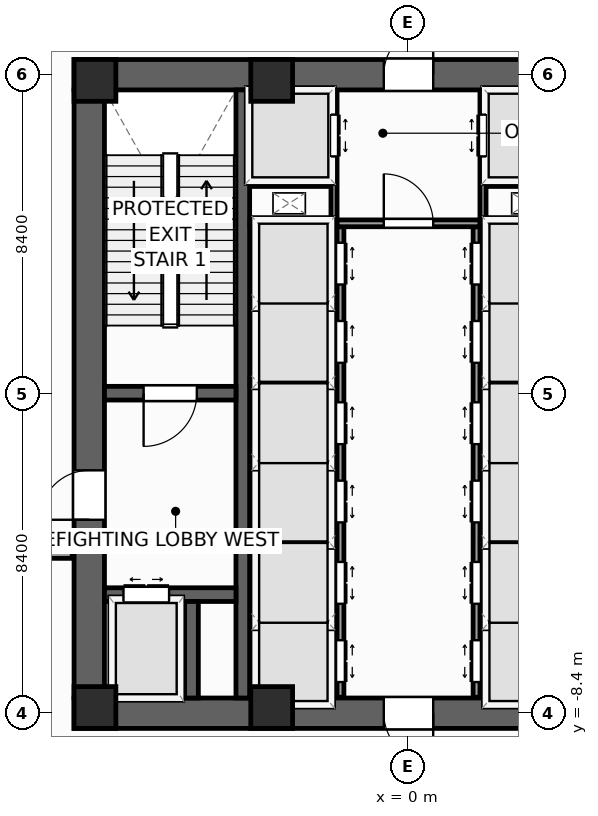
"""IFC4 building model, lengths in metres.
Left out: names, types, materials, properties, quantities, classifications, styles, units other than length and angle.
Written with IfcOpenShell. Run it as: python <this file> out.ifc"""

import sys

from ifc_helpers import new_model, si_unit, direction, frame, frame_2d, origin, origin_2d, place, context, subcontext, project, spatial, rectangle, extrude, source, transform, mapped, element, fill, save


model = new_model("IFC4")
c1 = context("Model", 3, precision=1e-05, world=origin(), true_north=direction((0.0, 1.0)))
c2 = subcontext(c1, "Body", "Model", "MODEL_VIEW")
j1 = project(units=[si_unit("LENGTHUNIT", "METRE"), si_unit("PLANEANGLEUNIT", "RADIAN")], contexts=[c1])
p1 = place(None, origin())
s1 = spatial("IfcSite", under=j1, at=p1, CompositionType="ELEMENT")
p2 = place(p1, origin())
s2 = spatial("IfcBuilding", under=s1, at=p2, CompositionType="ELEMENT")
p3 = place(p2, origin())
s3 = spatial("IfcBuildingStorey", under=s2, at=p3, CompositionType="ELEMENT", Elevation=0.0)
p4 = place(p3, frame((-8.8, -8.4, 0.0), z_axis=(0.0, 0.0, 1.0), x_axis=(1.0, 0.0, 0.0)))
e1 = element("IfcWall", 1, at=p4, inside=s3, PredefinedType="SHEAR", context=c2, shape_type="SweptSolid", body=[
    extrude(rectangle(XDim=17.6, YDim=0.8, at=frame_2d((8.8, 0.0))), origin(), (0.0, 0.0, 1.0), 6.0),
])
p5 = place(p4, frame((8.15, 0.0, 0.0)))
e2 = element("IfcOpeningElement", 2, at=p5, cuts=e1, PredefinedType="OPENING", context=c2, shape_type="SweptSolid", body=[
    extrude(rectangle(XDim=1.3, YDim=2.2, at=frame_2d((0.65, 1.1))), frame((0.0, 0.41, 0.0), z_axis=(0.0, -1.0, 0.0), x_axis=(1.0, 0.0, 0.0)), (0.0, 0.0, 1.0), 0.82),
])
p6 = place(p3, frame((-8.8, 8.4, 0.0), z_axis=(0.0, 0.0, 1.0), x_axis=(1.0, 0.0, 0.0)))
e3 = element("IfcWall", 3, at=p6, inside=s3, PredefinedType="SHEAR", context=c2, shape_type="SweptSolid", body=[
    extrude(rectangle(XDim=17.6, YDim=0.8, at=frame_2d((8.8, 0.0))), origin(), (0.0, 0.0, 1.0), 6.0),
])
p7 = place(p6, frame((8.15, 0.0, 0.0)))
e4 = element("IfcOpeningElement", 4, at=p7, cuts=e3, PredefinedType="OPENING", context=c2, shape_type="SweptSolid", body=[
    extrude(rectangle(XDim=1.3, YDim=2.2, at=frame_2d((0.65, 1.1))), frame((0.0, 0.41, 0.0), z_axis=(0.0, -1.0, 0.0), x_axis=(1.0, 0.0, 0.0)), (0.0, 0.0, 1.0), 0.82),
])
p8 = place(p3, frame((-8.4, -8.0, 0.0), z_axis=(0.0, 0.0, 1.0), x_axis=(0.0, 1.0, 0.0)))
e5 = element("IfcWall", 5, at=p8, inside=s3, PredefinedType="SHEAR", context=c2, shape_type="SweptSolid", body=[
    extrude(rectangle(XDim=16.0, YDim=0.8, at=frame_2d((8.0, 0.0))), origin(), (0.0, 0.0, 1.0), 6.0),
])
p9 = place(p8, frame((4.69, 0.0, 0.0)))
e6 = element("IfcOpeningElement", 6, at=p9, cuts=e5, PredefinedType="OPENING", context=c2, shape_type="SweptSolid", body=[
    extrude(rectangle(XDim=1.3, YDim=2.2, at=frame_2d((0.65, 1.1))), frame((0.0, 0.41, 0.0), z_axis=(0.0, -1.0, 0.0), x_axis=(1.0, 0.0, 0.0)), (0.0, 0.0, 1.0), 0.82),
])
p10 = place(p3, frame((-4.36, -8.0, 0.0), z_axis=(0.0, 0.0, 1.0), x_axis=(0.0, 1.0, 0.0)))
e7 = element("IfcWall", 7, at=p10, inside=s3, PredefinedType="SHEAR", context=c2, shape_type="SweptSolid", body=[
    extrude(rectangle(XDim=16.0, YDim=0.36, at=frame_2d((8.0, 0.0))), origin(), (0.0, 0.0, 1.0), 6.0),
])
p11 = place(p3, frame((-8.0, 0.02, 0.0), z_axis=(0.0, 0.0, 1.0), x_axis=(1.0, 0.0, 0.0)))
e8 = element("IfcWall", 8, at=p11, inside=s3, PredefinedType="SHEAR", context=c2, shape_type="SweptSolid", body=[
    extrude(rectangle(XDim=3.46, YDim=0.36, at=frame_2d((1.73, 0.0))), origin(), (0.0, 0.0, 1.0), 6.0),
])
p12 = place(p11, frame((1.03, 0.0, 0.0)))
e9 = element("IfcOpeningElement", 9, at=p12, cuts=e8, PredefinedType="OPENING", context=c2, shape_type="SweptSolid", body=[
    extrude(rectangle(XDim=1.4, YDim=2.2, at=frame_2d((0.7, 1.1))), frame((0.0, 0.19, 0.0), z_axis=(0.0, -1.0, 0.0), x_axis=(1.0, 0.0, 0.0)), (0.0, 0.0, 1.0), 0.38),
])
p13 = place(p3, frame((-8.0, -5.28, 0.0), z_axis=(0.0, 0.0, 1.0), x_axis=(1.0, 0.0, 0.0)))
e10 = element("IfcWall", 10, at=p13, inside=s3, PredefinedType="SHEAR", context=c2, shape_type="SweptSolid", body=[
    extrude(rectangle(XDim=3.46, YDim=0.36, at=frame_2d((1.73, 0.0))), origin(), (0.0, 0.0, 1.0), 6.0),
])
p14 = place(p13, frame((0.5, 0.0, 0.0)))
e11 = element("IfcOpeningElement", 11, at=p14, cuts=e10, PredefinedType="OPENING", context=c2, shape_type="SweptSolid", body=[
    extrude(rectangle(XDim=1.2, YDim=2.25, at=frame_2d((0.6, 1.125))), frame((0.0, 0.19, 0.0), z_axis=(0.0, -1.0, 0.0), x_axis=(1.0, 0.0, 0.0)), (0.0, 0.0, 1.0), 0.38),
])
p15 = place(p3, frame((-5.71, -8.0, 0.0), z_axis=(0.0, 0.0, 1.0), x_axis=(0.0, 1.0, 0.0)))
e12 = element("IfcWall", 12, at=p15, inside=s3, PredefinedType="SHEAR", context=c2, shape_type="SweptSolid", body=[
    extrude(rectangle(XDim=2.54, YDim=0.36, at=frame_2d((1.27, 0.0))), origin(), (0.0, 0.0, 1.0), 6.0),
])
m1 = source(origin(), c2, "Body", "SweptSolid", [
    extrude(rectangle(XDim=1.1, YDim=1.1, at=origin_2d()), origin(), (0.0, 0.0, 1.0), 6.0),
])
for number, where, z_axis, x_axis in (
    (13, (-8.25, -8.25, 0.0), (0.0, 0.0, 1.0), (1.0, 0.0, 0.0)),
    (14, (-8.25, 8.25, 0.0), (0.0, 0.0, 1.0), (1.0, 0.0, 0.0)),
    (15, (-3.6, -8.25, 0.0), (0.0, 0.0, 1.0), (1.0, 0.0, 0.0)),
    (16, (-3.6, 8.25, 0.0), (0.0, 0.0, 1.0), (1.0, 0.0, 0.0)),
):
    element("IfcColumn", number, at=place(p3, frame(where, z_axis=z_axis, x_axis=x_axis)), inside=s3, PredefinedType="PILASTER", context=c2, shape_type="MappedRepresentation", body=[
        mapped(m1, transform((0.0, 0.0, 0.0), scale=1.0)),
    ])
p16 = place(p3, frame((-1.79, -7.98, 0.0), z_axis=(0.0, 0.0, 1.0), x_axis=(0.0, 1.0, 0.0)))
e17 = element("IfcWall", 17, at=p16, inside=s3, PredefinedType="PARTITIONING", context=c2, shape_type="SweptSolid", body=[
    extrude(rectangle(XDim=12.38, YDim=0.18, at=frame_2d((6.19, 0.0))), origin(), (0.0, 0.0, 1.0), 5.66),
])
p17 = place(p16, frame((0.4, 0.0, 0.0)))
e18 = element("IfcOpeningElement", 18, at=p17, cuts=e17, PredefinedType="OPENING", context=c2, shape_type="SweptSolid", body=[
    extrude(rectangle(XDim=1.1, YDim=2.2, at=frame_2d((0.55, 1.1))), frame((0.0, 0.1, 0.0), z_axis=(0.0, -1.0, 0.0), x_axis=(1.0, 0.0, 0.0)), (0.0, 0.0, 1.0), 0.2),
])
p18 = place(p16, frame((2.46, 0.0, 0.0)))
e19 = element("IfcOpeningElement", 19, at=p18, cuts=e17, PredefinedType="OPENING", context=c2, shape_type="SweptSolid", body=[
    extrude(rectangle(XDim=1.1, YDim=2.2, at=frame_2d((0.55, 1.1))), frame((0.0, 0.1, 0.0), z_axis=(0.0, -1.0, 0.0), x_axis=(1.0, 0.0, 0.0)), (0.0, 0.0, 1.0), 0.2),
])
p19 = place(p16, frame((4.6, 0.0, 0.0)))
e20 = element("IfcOpeningElement", 20, at=p19, cuts=e17, PredefinedType="OPENING", context=c2, shape_type="SweptSolid", body=[
    extrude(rectangle(XDim=1.1, YDim=2.2, at=frame_2d((0.55, 1.1))), frame((0.0, 0.1, 0.0), z_axis=(0.0, -1.0, 0.0), x_axis=(1.0, 0.0, 0.0)), (0.0, 0.0, 1.0), 0.2),
])
p20 = place(p16, frame((6.66, 0.0, 0.0)))
e21 = element("IfcOpeningElement", 21, at=p20, cuts=e17, PredefinedType="OPENING", context=c2, shape_type="SweptSolid", body=[
    extrude(rectangle(XDim=1.1, YDim=2.2, at=frame_2d((0.55, 1.1))), frame((0.0, 0.1, 0.0), z_axis=(0.0, -1.0, 0.0), x_axis=(1.0, 0.0, 0.0)), (0.0, 0.0, 1.0), 0.2),
])
p21 = place(p16, frame((8.8, 0.0, 0.0)))
e22 = element("IfcOpeningElement", 22, at=p21, cuts=e17, PredefinedType="OPENING", context=c2, shape_type="SweptSolid", body=[
    extrude(rectangle(XDim=1.1, YDim=2.2, at=frame_2d((0.55, 1.1))), frame((0.0, 0.1, 0.0), z_axis=(0.0, -1.0, 0.0), x_axis=(1.0, 0.0, 0.0)), (0.0, 0.0, 1.0), 0.2),
])
p22 = place(p16, frame((10.86, 0.0, 0.0)))
e23 = element("IfcOpeningElement", 23, at=p22, cuts=e17, PredefinedType="OPENING", context=c2, shape_type="SweptSolid", body=[
    extrude(rectangle(XDim=1.1, YDim=2.2, at=frame_2d((0.55, 1.1))), frame((0.0, 0.1, 0.0), z_axis=(0.0, -1.0, 0.0), x_axis=(1.0, 0.0, 0.0)), (0.0, 0.0, 1.0), 0.2),
])
p23 = place(p3, frame((1.79, -7.98, 0.0), z_axis=(0.0, 0.0, 1.0), x_axis=(0.0, 1.0, 0.0)))
e24 = element("IfcWall", 24, at=p23, inside=s3, PredefinedType="PARTITIONING", context=c2, shape_type="SweptSolid", body=[
    extrude(rectangle(XDim=12.38, YDim=0.18, at=frame_2d((6.19, 0.0))), origin(), (0.0, 0.0, 1.0), 5.66),
])
p24 = place(p23, frame((0.4, 0.0, 0.0)))
e25 = element("IfcOpeningElement", 25, at=p24, cuts=e24, PredefinedType="OPENING", context=c2, shape_type="SweptSolid", body=[
    extrude(rectangle(XDim=1.1, YDim=2.2, at=frame_2d((0.55, 1.1))), frame((0.0, 0.1, 0.0), z_axis=(0.0, -1.0, 0.0), x_axis=(1.0, 0.0, 0.0)), (0.0, 0.0, 1.0), 0.2),
])
p25 = place(p23, frame((2.46, 0.0, 0.0)))
e26 = element("IfcOpeningElement", 26, at=p25, cuts=e24, PredefinedType="OPENING", context=c2, shape_type="SweptSolid", body=[
    extrude(rectangle(XDim=1.1, YDim=2.2, at=frame_2d((0.55, 1.1))), frame((0.0, 0.1, 0.0), z_axis=(0.0, -1.0, 0.0), x_axis=(1.0, 0.0, 0.0)), (0.0, 0.0, 1.0), 0.2),
])
p26 = place(p23, frame((4.6, 0.0, 0.0)))
e27 = element("IfcOpeningElement", 27, at=p26, cuts=e24, PredefinedType="OPENING", context=c2, shape_type="SweptSolid", body=[
    extrude(rectangle(XDim=1.1, YDim=2.2, at=frame_2d((0.55, 1.1))), frame((0.0, 0.1, 0.0), z_axis=(0.0, -1.0, 0.0), x_axis=(1.0, 0.0, 0.0)), (0.0, 0.0, 1.0), 0.2),
])
p27 = place(p23, frame((6.66, 0.0, 0.0)))
e28 = element("IfcOpeningElement", 28, at=p27, cuts=e24, PredefinedType="OPENING", context=c2, shape_type="SweptSolid", body=[
    extrude(rectangle(XDim=1.1, YDim=2.2, at=frame_2d((0.55, 1.1))), frame((0.0, 0.1, 0.0), z_axis=(0.0, -1.0, 0.0), x_axis=(1.0, 0.0, 0.0)), (0.0, 0.0, 1.0), 0.2),
])
p28 = place(p23, frame((8.8, 0.0, 0.0)))
e29 = element("IfcOpeningElement", 29, at=p28, cuts=e24, PredefinedType="OPENING", context=c2, shape_type="SweptSolid", body=[
    extrude(rectangle(XDim=1.1, YDim=2.2, at=frame_2d((0.55, 1.1))), frame((0.0, 0.1, 0.0), z_axis=(0.0, -1.0, 0.0), x_axis=(1.0, 0.0, 0.0)), (0.0, 0.0, 1.0), 0.2),
])
p29 = place(p23, frame((10.86, 0.0, 0.0)))
e30 = element("IfcOpeningElement", 30, at=p29, cuts=e24, PredefinedType="OPENING", context=c2, shape_type="SweptSolid", body=[
    extrude(rectangle(XDim=1.1, YDim=2.2, at=frame_2d((0.55, 1.1))), frame((0.0, 0.1, 0.0), z_axis=(0.0, -1.0, 0.0), x_axis=(1.0, 0.0, 0.0)), (0.0, 0.0, 1.0), 0.2),
])
p30 = place(p3, frame((-1.88, 4.49, 0.0), z_axis=(0.0, 0.0, 1.0), x_axis=(1.0, 0.0, 0.0)))
e31 = element("IfcWall", 31, at=p30, inside=s3, PredefinedType="PARTITIONING", context=c2, shape_type="SweptSolid", body=[
    extrude(rectangle(XDim=3.76, YDim=0.18, at=frame_2d((1.88, 0.0))), origin(), (0.0, 0.0, 1.0), 5.66),
])
p31 = place(p30, frame((1.23, 0.0, 0.0)))
e32 = element("IfcOpeningElement", 32, at=p31, cuts=e31, PredefinedType="OPENING", context=c2, shape_type="SweptSolid", body=[
    extrude(rectangle(XDim=1.3, YDim=2.2, at=frame_2d((0.65, 1.1))), frame((0.0, 0.1, 0.0), z_axis=(0.0, -1.0, 0.0), x_axis=(1.0, 0.0, 0.0)), (0.0, 0.0, 1.0), 0.2),
])
for number, where, z_axis, x_axis in (
    (33, (-4.17, -3.9, 0.0), (0.0, 0.0, 1.0), (1.0, 0.0, 0.0)),
    (34, (1.89, -3.9, 0.0), (0.0, 0.0, 1.0), (1.0, 0.0, 0.0)),
    (35, (-4.17, 0.3, 0.0), (0.0, 0.0, 1.0), (1.0, 0.0, 0.0)),
    (36, (1.89, 0.3, 0.0), (0.0, 0.0, 1.0), (1.0, 0.0, 0.0)),
    (37, (-4.17, 4.49, 0.0), (0.0, 0.0, 1.0), (1.0, 0.0, 0.0)),
    (38, (1.89, 4.49, 0.0), (0.0, 0.0, 1.0), (1.0, 0.0, 0.0)),
):
    element("IfcWall", number, at=place(p3, frame(where, z_axis=z_axis, x_axis=x_axis)), inside=s3, PredefinedType="PARTITIONING", context=c2, shape_type="SweptSolid", body=[
        extrude(rectangle(XDim=2.28, YDim=0.18, at=frame_2d((1.14, 0.0))), origin(), (0.0, 0.0, 1.0), 5.66),
    ])
for number, where, z_axis, x_axis in (
    (39, (-4.16, -6.0, 0.0), (0.0, 0.0, 1.0), (1.0, 0.0, 0.0)),
    (40, (1.9, -6.0, 0.0), (0.0, 0.0, 1.0), (1.0, 0.0, 0.0)),
    (41, (-4.16, -1.8, 0.0), (0.0, 0.0, 1.0), (1.0, 0.0, 0.0)),
    (42, (1.9, -1.8, 0.0), (0.0, 0.0, 1.0), (1.0, 0.0, 0.0)),
    (43, (-4.16, 2.4, 0.0), (0.0, 0.0, 1.0), (1.0, 0.0, 0.0)),
    (44, (1.9, 2.4, 0.0), (0.0, 0.0, 1.0), (1.0, 0.0, 0.0)),
):
    element("IfcWall", number, at=place(p3, frame(where, z_axis=z_axis, x_axis=x_axis)), inside=s3, PredefinedType="PARTITIONING", context=c2, shape_type="SweptSolid", body=[
        extrude(rectangle(XDim=2.26, YDim=0.12, at=frame_2d((1.13, 0.0))), origin(), (0.0, 0.0, 1.0), 5.66),
    ])
p32 = place(p3, frame((-1.96, 4.58, 0.0), z_axis=(0.0, 0.0, 1.0), x_axis=(0.0, 1.0, 0.0)))
e45 = element("IfcWall", 45, at=p32, inside=s3, PredefinedType="PARTITIONING", context=c2, shape_type="SweptSolid", body=[
    extrude(rectangle(XDim=3.4, YDim=0.16, at=frame_2d((1.7, 0.0))), origin(), (0.0, 0.0, 1.0), 5.66),
])
p33 = place(p32, frame((1.67, 0.0, 0.0)))
e46 = element("IfcOpeningElement", 46, at=p33, cuts=e45, PredefinedType="OPENING", context=c2, shape_type="SweptSolid", body=[
    extrude(rectangle(XDim=1.1, YDim=2.2, at=frame_2d((0.55, 1.1))), frame((0.0, 0.09, 0.0), z_axis=(0.0, -1.0, 0.0), x_axis=(1.0, 0.0, 0.0)), (0.0, 0.0, 1.0), 0.18),
])
p34 = place(p3, frame((1.96, 4.58, 0.0), z_axis=(0.0, 0.0, 1.0), x_axis=(0.0, 1.0, 0.0)))
e47 = element("IfcWall", 47, at=p34, inside=s3, PredefinedType="PARTITIONING", context=c2, shape_type="SweptSolid", body=[
    extrude(rectangle(XDim=3.4, YDim=0.16, at=frame_2d((1.7, 0.0))), origin(), (0.0, 0.0, 1.0), 5.66),
])
p35 = place(p34, frame((1.67, 0.0, 0.0)))
e48 = element("IfcOpeningElement", 48, at=p35, cuts=e47, PredefinedType="OPENING", context=c2, shape_type="SweptSolid", body=[
    extrude(rectangle(XDim=1.1, YDim=2.2, at=frame_2d((0.55, 1.1))), frame((0.0, 0.09, 0.0), z_axis=(0.0, -1.0, 0.0), x_axis=(1.0, 0.0, 0.0)), (0.0, 0.0, 1.0), 0.18),
])
for number, where, z_axis, x_axis in (
    (49, (-4.16, 5.52, 0.0), (0.0, 0.0, 1.0), (1.0, 0.0, 0.0)),
    (50, (2.06, 5.52, 0.0), (0.0, 0.0, 1.0), (1.0, 0.0, 0.0)),
):
    element("IfcWall", number, at=place(p3, frame(where, z_axis=z_axis, x_axis=x_axis)), inside=s3, PredefinedType="PARTITIONING", context=c2, shape_type="SweptSolid", body=[
        extrude(rectangle(XDim=2.1, YDim=0.12, at=frame_2d((1.05, 0.0))), origin(), (0.0, 0.0, 1.0), 5.66),
    ])
p36 = place(p3, frame((-11.55, -4.2, 0.0), z_axis=(0.0, 0.0, 1.0), x_axis=(1.0, 0.0, 0.0)))
e51 = element("IfcWall", 51, at=p36, inside=s3, PredefinedType="PARTITIONING", context=c2, shape_type="SweptSolid", body=[
    extrude(rectangle(XDim=2.7, YDim=0.25, at=frame_2d((1.35, 0.0))), origin(), (0.0, 0.0, 1.0), 5.66),
])
m2 = source(origin(), c2, "Body", "SweptSolid", [
    extrude(rectangle(XDim=1.4, YDim=2.2, at=frame_2d((0.7, 1.1))), frame((0.0, 0.025, 0.0), z_axis=(0.0, -1.0, 0.0), x_axis=(1.0, 0.0, 0.0)), (0.0, 0.0, 1.0), 0.05),
])
p37 = place(p12, frame((1.4, 0.0, 0.0), z_axis=(0.0, 0.0, 1.0), x_axis=(-1.0, 0.0, 0.0)))
e52 = element("IfcDoor", 52, at=p37, inside=s3, OperationType="SINGLE_SWING_LEFT", PredefinedType="DOOR", context=c2, shape_type="MappedRepresentation", body=[
    mapped(m2, transform((0.0, 0.0, 0.0), scale=1.0)),
])
fill(e9, e52)
m3 = source(origin(), c2, "Body", "SweptSolid", [
    extrude(rectangle(XDim=1.3, YDim=2.2, at=frame_2d((0.65, 1.1))), frame((0.0, 0.025, 0.0), z_axis=(0.0, -1.0, 0.0), x_axis=(1.0, 0.0, 0.0)), (0.0, 0.0, 1.0), 0.05),
])
p38 = place(p9, origin())
e53 = element("IfcDoor", 53, at=p38, inside=s3, OperationType="SINGLE_SWING_LEFT", PredefinedType="DOOR", context=c2, shape_type="MappedRepresentation", body=[
    mapped(m3, transform((0.0, 0.0, 0.0), scale=1.0)),
])
fill(e6, e53)
p39 = place(p5, frame((1.3, 0.0, 0.0), z_axis=(0.0, 0.0, 1.0), x_axis=(-1.0, 0.0, 0.0)))
e54 = element("IfcDoor", 54, at=p39, inside=s3, OperationType="SINGLE_SWING_RIGHT", PredefinedType="DOOR", context=c2, shape_type="MappedRepresentation", body=[
    mapped(m3, transform((0.0, 0.0, 0.0), scale=1.0)),
])
fill(e2, e54)
m4 = source(origin(), c2, "Body", "SweptSolid", [
    extrude(rectangle(XDim=1.2, YDim=2.25, at=frame_2d((0.6, 1.125))), frame((0.0, 0.025, 0.0), z_axis=(0.0, -1.0, 0.0), x_axis=(1.0, 0.0, 0.0)), (0.0, 0.0, 1.0), 0.05),
])
p40 = place(p14, origin())
e55 = element("IfcDoor", 55, at=p40, inside=s3, OperationType="DOUBLE_DOOR_SLIDING", PredefinedType="DOOR", context=c2, shape_type="MappedRepresentation", body=[
    mapped(m4, transform((0.0, 0.0, 0.0), scale=1.0)),
])
fill(e11, e55)
m5 = source(origin(), c2, "Body", "SweptSolid", [
    extrude(rectangle(XDim=1.1, YDim=2.2, at=frame_2d((0.55, 1.1))), frame((0.0, 0.025, 0.0), z_axis=(0.0, -1.0, 0.0), x_axis=(1.0, 0.0, 0.0)), (0.0, 0.0, 1.0), 0.05),
])
p41 = place(p17, frame((1.1, 0.0, 0.0), z_axis=(0.0, 0.0, 1.0), x_axis=(-1.0, 0.0, 0.0)))
e56 = element("IfcDoor", 56, at=p41, inside=s3, OperationType="DOUBLE_DOOR_SLIDING", PredefinedType="DOOR", context=c2, shape_type="MappedRepresentation", body=[
    mapped(m5, transform((0.0, 0.0, 0.0), scale=1.0)),
])
fill(e18, e56)
p42 = place(p18, frame((1.1, 0.0, 0.0), z_axis=(0.0, 0.0, 1.0), x_axis=(-1.0, 0.0, 0.0)))
e57 = element("IfcDoor", 57, at=p42, inside=s3, OperationType="DOUBLE_DOOR_SLIDING", PredefinedType="DOOR", context=c2, shape_type="MappedRepresentation", body=[
    mapped(m5, transform((0.0, 0.0, 0.0), scale=1.0)),
])
fill(e19, e57)
p43 = place(p24, origin())
e58 = element("IfcDoor", 58, at=p43, inside=s3, OperationType="DOUBLE_DOOR_SLIDING", PredefinedType="DOOR", context=c2, shape_type="MappedRepresentation", body=[
    mapped(m5, transform((0.0, 0.0, 0.0), scale=1.0)),
])
fill(e25, e58)
p44 = place(p25, origin())
e59 = element("IfcDoor", 59, at=p44, inside=s3, OperationType="DOUBLE_DOOR_SLIDING", PredefinedType="DOOR", context=c2, shape_type="MappedRepresentation", body=[
    mapped(m5, transform((0.0, 0.0, 0.0), scale=1.0)),
])
fill(e26, e59)
p45 = place(p19, frame((1.1, 0.0, 0.0), z_axis=(0.0, 0.0, 1.0), x_axis=(-1.0, 0.0, 0.0)))
e60 = element("IfcDoor", 60, at=p45, inside=s3, OperationType="DOUBLE_DOOR_SLIDING", PredefinedType="DOOR", context=c2, shape_type="MappedRepresentation", body=[
    mapped(m5, transform((0.0, 0.0, 0.0), scale=1.0)),
])
fill(e20, e60)
p46 = place(p20, frame((1.1, 0.0, 0.0), z_axis=(0.0, 0.0, 1.0), x_axis=(-1.0, 0.0, 0.0)))
e61 = element("IfcDoor", 61, at=p46, inside=s3, OperationType="DOUBLE_DOOR_SLIDING", PredefinedType="DOOR", context=c2, shape_type="MappedRepresentation", body=[
    mapped(m5, transform((0.0, 0.0, 0.0), scale=1.0)),
])
fill(e21, e61)
p47 = place(p26, origin())
e62 = element("IfcDoor", 62, at=p47, inside=s3, OperationType="DOUBLE_DOOR_SLIDING", PredefinedType="DOOR", context=c2, shape_type="MappedRepresentation", body=[
    mapped(m5, transform((0.0, 0.0, 0.0), scale=1.0)),
])
fill(e27, e62)
p48 = place(p27, origin())
e63 = element("IfcDoor", 63, at=p48, inside=s3, OperationType="DOUBLE_DOOR_SLIDING", PredefinedType="DOOR", context=c2, shape_type="MappedRepresentation", body=[
    mapped(m5, transform((0.0, 0.0, 0.0), scale=1.0)),
])
fill(e28, e63)
p49 = place(p21, frame((1.1, 0.0, 0.0), z_axis=(0.0, 0.0, 1.0), x_axis=(-1.0, 0.0, 0.0)))
e64 = element("IfcDoor", 64, at=p49, inside=s3, OperationType="DOUBLE_DOOR_SLIDING", PredefinedType="DOOR", context=c2, shape_type="MappedRepresentation", body=[
    mapped(m5, transform((0.0, 0.0, 0.0), scale=1.0)),
])
fill(e22, e64)
p50 = place(p22, frame((1.1, 0.0, 0.0), z_axis=(0.0, 0.0, 1.0), x_axis=(-1.0, 0.0, 0.0)))
e65 = element("IfcDoor", 65, at=p50, inside=s3, OperationType="DOUBLE_DOOR_SLIDING", PredefinedType="DOOR", context=c2, shape_type="MappedRepresentation", body=[
    mapped(m5, transform((0.0, 0.0, 0.0), scale=1.0)),
])
fill(e23, e65)
p51 = place(p28, origin())
e66 = element("IfcDoor", 66, at=p51, inside=s3, OperationType="DOUBLE_DOOR_SLIDING", PredefinedType="DOOR", context=c2, shape_type="MappedRepresentation", body=[
    mapped(m5, transform((0.0, 0.0, 0.0), scale=1.0)),
])
fill(e29, e66)
p52 = place(p29, origin())
e67 = element("IfcDoor", 67, at=p52, inside=s3, OperationType="DOUBLE_DOOR_SLIDING", PredefinedType="DOOR", context=c2, shape_type="MappedRepresentation", body=[
    mapped(m5, transform((0.0, 0.0, 0.0), scale=1.0)),
])
fill(e30, e67)
p53 = place(p31, origin())
e68 = element("IfcDoor", 68, at=p53, inside=s3, OperationType="SINGLE_SWING_LEFT", PredefinedType="DOOR", context=c2, shape_type="MappedRepresentation", body=[
    mapped(m3, transform((0.0, 0.0, 0.0), scale=1.0)),
])
fill(e32, e68)
p54 = place(p7, origin())
e69 = element("IfcDoor", 69, at=p54, inside=s3, OperationType="SINGLE_SWING_RIGHT", PredefinedType="DOOR", context=c2, shape_type="MappedRepresentation", body=[
    mapped(m3, transform((0.0, 0.0, 0.0), scale=1.0)),
])
fill(e4, e69)
p55 = place(p33, frame((1.1, 0.0, 0.0), z_axis=(0.0, 0.0, 1.0), x_axis=(-1.0, 0.0, 0.0)))
e70 = element("IfcDoor", 70, at=p55, inside=s3, OperationType="DOUBLE_DOOR_SLIDING", PredefinedType="DOOR", context=c2, shape_type="MappedRepresentation", body=[
    mapped(m5, transform((0.0, 0.0, 0.0), scale=1.0)),
])
fill(e46, e70)
p56 = place(p35, origin())
e71 = element("IfcDoor", 71, at=p56, inside=s3, OperationType="DOUBLE_DOOR_SLIDING", PredefinedType="DOOR", context=c2, shape_type="MappedRepresentation", body=[
    mapped(m5, transform((0.0, 0.0, 0.0), scale=1.0)),
])
fill(e48, e71)
save(model, sys.argv[1])
